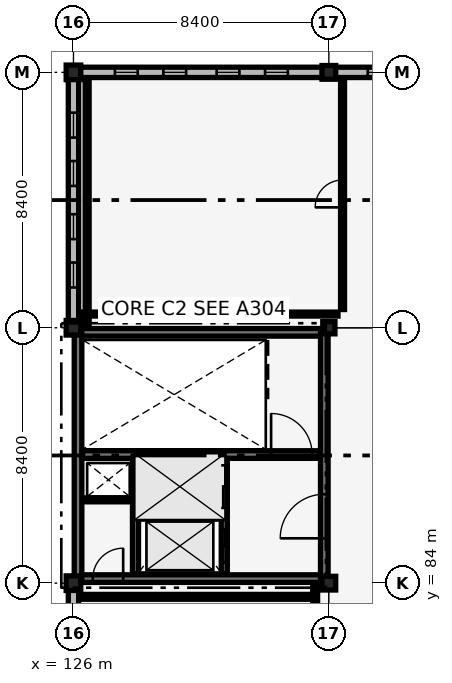
"""IFC4 building model, lengths in metres.
Left out: names, types, materials, properties, quantities, classifications, styles, units other than length and angle.
Written with IfcOpenShell. Run it as: python <this file> out.ifc"""

import sys

from ifc_helpers import new_model, si_unit, direction, frame, frame_2d, origin, origin_2d, place, context, subcontext, project, spatial, rectangle, extrude, element, fill, save


model = new_model("IFC4")
c1 = context("Model", 3, precision=1e-05, world=origin(), true_north=direction((0.0, 1.0)))
c2 = subcontext(c1, "Body", "Model", "MODEL_VIEW")
j1 = project(units=[si_unit("LENGTHUNIT", "METRE"), si_unit("PLANEANGLEUNIT", "RADIAN")], contexts=[c1])
p1 = place(None, origin())
s1 = spatial("IfcSite", under=j1, at=p1, CompositionType="ELEMENT")
p2 = place(p1, origin())
s2 = spatial("IfcBuilding", under=s1, at=p2, CompositionType="ELEMENT")
p3 = place(p2, frame((0.0, 0.0, 26.18)))
s3 = spatial("IfcBuildingStorey", under=s2, at=p3, CompositionType="ELEMENT", Elevation=26.18)
p4 = place(p3, frame((126.15, 84.15, 0.0), z_axis=(0.0, 0.0, 1.0), x_axis=(1.0, 0.0, 0.0)))
e1 = element("IfcWall", 1, at=p4, inside=s3, PredefinedType="SHEAR", context=c2, shape_type="SweptSolid", body=[
    extrude(rectangle(XDim=8.1, YDim=0.25, at=frame_2d((4.05, 0.0))), origin(), (0.0, 0.0, 1.0), 3.84),
])
p5 = place(p4, frame((0.485, 0.0, 0.0)))
e2 = element("IfcOpeningElement", 2, at=p5, cuts=e1, PredefinedType="OPENING", context=c2, shape_type="SweptSolid", body=[
    extrude(rectangle(XDim=1.0, YDim=2.15, at=frame_2d((0.5, 1.075))), frame((0.0, 0.135, 0.0), z_axis=(0.0, -1.0, 0.0), x_axis=(1.0, 0.0, 0.0)), (0.0, 0.0, 1.0), 0.27),
])
for number, where, z_axis, x_axis in (
    (3, (126.15, 92.25, 0.0), (0.0, 0.0, 1.0), (1.0, 0.0, 0.0)),
    (4, (126.15, 84.15, 0.0), (0.0, 0.0, 1.0), (0.0, 1.0, 0.0)),
):
    element("IfcWall", number, at=place(p3, frame(where, z_axis=z_axis, x_axis=x_axis)), inside=s3, PredefinedType="SHEAR", context=c2, shape_type="SweptSolid", body=[
        extrude(rectangle(XDim=8.1, YDim=0.25, at=frame_2d((4.05, 0.0))), origin(), (0.0, 0.0, 1.0), 3.84),
    ])
p6 = place(p3, frame((134.25, 84.15, 0.0), z_axis=(0.0, 0.0, 1.0), x_axis=(0.0, 1.0, 0.0)))
e5 = element("IfcWall", 5, at=p6, inside=s3, PredefinedType="SHEAR", context=c2, shape_type="SweptSolid", body=[
    extrude(rectangle(XDim=8.1, YDim=0.25, at=frame_2d((4.05, 0.0))), origin(), (0.0, 0.0, 1.0), 3.84),
])
p7 = place(p6, frame((1.325, 0.0, 0.0)))
e6 = element("IfcOpeningElement", 6, at=p7, cuts=e5, PredefinedType="OPENING", context=c2, shape_type="SweptSolid", body=[
    extrude(rectangle(XDim=1.45, YDim=2.15, at=frame_2d((0.725, 1.075))), frame((0.0, 0.135, 0.0), z_axis=(0.0, -1.0, 0.0), x_axis=(1.0, 0.0, 0.0)), (0.0, 0.0, 1.0), 0.27),
])
p8 = place(p3, frame((126.3, 88.23, 0.0), z_axis=(0.0, 0.0, 1.0), x_axis=(1.0, 0.0, 0.0)))
e7 = element("IfcWall", 7, at=p8, inside=s3, PredefinedType="SHEAR", context=c2, shape_type="SweptSolid", body=[
    extrude(rectangle(XDim=7.8, YDim=0.25, at=frame_2d((3.9, 0.0))), origin(), (0.0, 0.0, 1.0), 3.84),
])
p9 = place(p8, frame((6.2, 0.0, 0.0)))
e8 = element("IfcOpeningElement", 8, at=p9, cuts=e7, PredefinedType="OPENING", context=c2, shape_type="SweptSolid", body=[
    extrude(rectangle(XDim=1.35, YDim=2.15, at=frame_2d((0.675, 1.075))), frame((0.0, 0.135, 0.0), z_axis=(0.0, -1.0, 0.0), x_axis=(1.0, 0.0, 0.0)), (0.0, 0.0, 1.0), 0.27),
])
for number, where, z_axis, x_axis in (
    (9, (126.0, 84.0, 0.0), (0.0, 0.0, 1.0), (1.0, 0.0, 0.0)),
    (10, (126.0, 92.4, 0.0), (0.0, 0.0, 1.0), (1.0, 0.0, 0.0)),
    (11, (126.0, 100.8, 0.0), (0.0, 0.0, 1.0), (1.0, 0.0, 0.0)),
):
    element("IfcColumn", number, at=place(p3, frame(where, z_axis=z_axis, x_axis=x_axis)), inside=s3, PredefinedType="COLUMN", context=c2, shape_type="SweptSolid", body=[
        extrude(rectangle(XDim=0.48, YDim=0.48, at=origin_2d()), origin(), (0.0, 0.0, 1.0), 3.84),
    ])
p10 = place(p3, frame((134.4, 84.0, 0.0), z_axis=(0.0, 0.0, 1.0), x_axis=(1.0, 0.0, 0.0)))
e12 = element("IfcColumn", 12, at=p10, inside=s3, PredefinedType="COLUMN", context=c2, shape_type="SweptSolid", body=[
    extrude(rectangle(XDim=0.45, YDim=0.45, at=origin_2d()), origin(), (0.0, 0.0, 1.0), 3.84),
])
p11 = place(p3, frame((134.4, 92.4, 0.0), z_axis=(0.0, 0.0, 1.0), x_axis=(1.0, 0.0, 0.0)))
e13 = element("IfcColumn", 13, at=p11, inside=s3, PredefinedType="COLUMN", context=c2, shape_type="SweptSolid", body=[
    extrude(rectangle(XDim=0.4, YDim=0.4, at=origin_2d()), origin(), (0.0, 0.0, 1.0), 3.84),
])
p12 = place(p3, frame((134.4, 100.8, 0.0), z_axis=(0.0, 0.0, 1.0), x_axis=(1.0, 0.0, 0.0)))
e14 = element("IfcColumn", 14, at=p12, inside=s3, PredefinedType="COLUMN", context=c2, shape_type="SweptSolid", body=[
    extrude(rectangle(XDim=0.45, YDim=0.45, at=origin_2d()), origin(), (0.0, 0.0, 1.0), 3.84),
])
p13 = place(p3, frame((126.0, 75.825, 0.0), z_axis=(0.0, 0.0, 1.0), x_axis=(0.0, 1.0, 0.0)))
e15 = element("IfcWall", 15, at=p13, inside=s3, PredefinedType="SOLIDWALL", context=c2, shape_type="SweptSolid", body=[
    extrude(rectangle(XDim=7.95, YDim=0.34, at=frame_2d((3.975, 0.0))), origin(), (0.0, 0.0, 1.0), 3.48),
])
p14 = place(p13, frame((1.15, 0.0, 0.75)))
e16 = element("IfcOpeningElement", 16, at=p14, cuts=e15, PredefinedType="OPENING", context=c2, shape_type="SweptSolid", body=[
    extrude(rectangle(XDim=0.72, YDim=2.4, at=frame_2d((0.36, 1.2))), frame((0.0, 0.18, 0.0), z_axis=(0.0, -1.0, 0.0), x_axis=(1.0, 0.0, 0.0)), (0.0, 0.0, 1.0), 0.36),
])
p15 = place(p13, frame((2.74, 0.0, 0.75)))
e17 = element("IfcOpeningElement", 17, at=p15, cuts=e15, PredefinedType="OPENING", context=c2, shape_type="SweptSolid", body=[
    extrude(rectangle(XDim=0.72, YDim=2.4, at=frame_2d((0.36, 1.2))), frame((0.0, 0.18, 0.0), z_axis=(0.0, -1.0, 0.0), x_axis=(1.0, 0.0, 0.0)), (0.0, 0.0, 1.0), 0.36),
])
p16 = place(p13, frame((4.49, 0.0, 0.75)))
e18 = element("IfcOpeningElement", 18, at=p16, cuts=e15, PredefinedType="OPENING", context=c2, shape_type="SweptSolid", body=[
    extrude(rectangle(XDim=0.72, YDim=2.4, at=frame_2d((0.36, 1.2))), frame((0.0, 0.18, 0.0), z_axis=(0.0, -1.0, 0.0), x_axis=(1.0, 0.0, 0.0)), (0.0, 0.0, 1.0), 0.36),
])
p17 = place(p13, frame((6.08, 0.0, 0.75)))
e19 = element("IfcOpeningElement", 19, at=p17, cuts=e15, PredefinedType="OPENING", context=c2, shape_type="SweptSolid", body=[
    extrude(rectangle(XDim=0.72, YDim=2.4, at=frame_2d((0.36, 1.2))), frame((0.0, 0.18, 0.0), z_axis=(0.0, -1.0, 0.0), x_axis=(1.0, 0.0, 0.0)), (0.0, 0.0, 1.0), 0.36),
])
p18 = place(p3, frame((126.225, 100.8, 0.0), z_axis=(0.0, 0.0, 1.0), x_axis=(1.0, 0.0, 0.0)))
e20 = element("IfcWall", 20, at=p18, inside=s3, PredefinedType="SOLIDWALL", context=c2, shape_type="SweptSolid", body=[
    extrude(rectangle(XDim=7.965, YDim=0.34, at=frame_2d((3.982, 0.0))), origin(), (0.0, 0.0, 1.0), 3.84),
])
p19 = place(p18, frame((1.138, 0.0, 0.75)))
e21 = element("IfcOpeningElement", 21, at=p19, cuts=e20, PredefinedType="OPENING", context=c2, shape_type="SweptSolid", body=[
    extrude(rectangle(XDim=0.75, YDim=2.1, at=frame_2d((0.375, 1.05))), frame((0.0, 0.18, 0.0), z_axis=(0.0, -1.0, 0.0), x_axis=(1.0, 0.0, 0.0)), (0.0, 0.0, 1.0), 0.36),
])
p20 = place(p18, frame((2.731, 0.0, 0.75)))
e22 = element("IfcOpeningElement", 22, at=p20, cuts=e20, PredefinedType="OPENING", context=c2, shape_type="SweptSolid", body=[
    extrude(rectangle(XDim=0.75, YDim=2.1, at=frame_2d((0.375, 1.05))), frame((0.0, 0.18, 0.0), z_axis=(0.0, -1.0, 0.0), x_axis=(1.0, 0.0, 0.0)), (0.0, 0.0, 1.0), 0.36),
])
p21 = place(p18, frame((4.484, 0.0, 0.75)))
e23 = element("IfcOpeningElement", 23, at=p21, cuts=e20, PredefinedType="OPENING", context=c2, shape_type="SweptSolid", body=[
    extrude(rectangle(XDim=0.75, YDim=2.1, at=frame_2d((0.375, 1.05))), frame((0.0, 0.18, 0.0), z_axis=(0.0, -1.0, 0.0), x_axis=(1.0, 0.0, 0.0)), (0.0, 0.0, 1.0), 0.36),
])
p22 = place(p18, frame((6.077, 0.0, 0.75)))
e24 = element("IfcOpeningElement", 24, at=p22, cuts=e20, PredefinedType="OPENING", context=c2, shape_type="SweptSolid", body=[
    extrude(rectangle(XDim=0.75, YDim=2.1, at=frame_2d((0.375, 1.05))), frame((0.0, 0.18, 0.0), z_axis=(0.0, -1.0, 0.0), x_axis=(1.0, 0.0, 0.0)), (0.0, 0.0, 1.0), 0.36),
])
p23 = place(p3, frame((126.0, 92.625, 0.0), z_axis=(0.0, 0.0, 1.0), x_axis=(0.0, 1.0, 0.0)))
e25 = element("IfcWall", 25, at=p23, inside=s3, PredefinedType="SOLIDWALL", context=c2, shape_type="SweptSolid", body=[
    extrude(rectangle(XDim=7.95, YDim=0.34, at=frame_2d((3.975, 0.0))), origin(), (0.0, 0.0, 1.0), 3.48),
])
p24 = place(p23, frame((1.101, 0.0, 0.75)))
e26 = element("IfcOpeningElement", 26, at=p24, cuts=e25, PredefinedType="OPENING", context=c2, shape_type="SweptSolid", body=[
    extrude(rectangle(XDim=0.82, YDim=2.4, at=frame_2d((0.41, 1.2))), frame((0.0, 0.18, 0.0), z_axis=(0.0, -1.0, 0.0), x_axis=(1.0, 0.0, 0.0)), (0.0, 0.0, 1.0), 0.36),
])
p25 = place(p23, frame((2.69, 0.0, 0.75)))
e27 = element("IfcOpeningElement", 27, at=p25, cuts=e25, PredefinedType="OPENING", context=c2, shape_type="SweptSolid", body=[
    extrude(rectangle(XDim=0.82, YDim=2.4, at=frame_2d((0.41, 1.2))), frame((0.0, 0.18, 0.0), z_axis=(0.0, -1.0, 0.0), x_axis=(1.0, 0.0, 0.0)), (0.0, 0.0, 1.0), 0.36),
])
p26 = place(p23, frame((4.439, 0.0, 0.75)))
e28 = element("IfcOpeningElement", 28, at=p26, cuts=e25, PredefinedType="OPENING", context=c2, shape_type="SweptSolid", body=[
    extrude(rectangle(XDim=0.82, YDim=2.4, at=frame_2d((0.41, 1.2))), frame((0.0, 0.18, 0.0), z_axis=(0.0, -1.0, 0.0), x_axis=(1.0, 0.0, 0.0)), (0.0, 0.0, 1.0), 0.36),
])
p27 = place(p23, frame((6.03, 0.0, 0.75)))
e29 = element("IfcOpeningElement", 29, at=p27, cuts=e25, PredefinedType="OPENING", context=c2, shape_type="SweptSolid", body=[
    extrude(rectangle(XDim=0.82, YDim=2.4, at=frame_2d((0.41, 1.2))), frame((0.0, 0.18, 0.0), z_axis=(0.0, -1.0, 0.0), x_axis=(1.0, 0.0, 0.0)), (0.0, 0.0, 1.0), 0.36),
])
p28 = place(p3, frame((134.61, 100.8, 0.0), z_axis=(0.0, 0.0, 1.0), x_axis=(1.0, 0.0, 0.0)))
e30 = element("IfcWall", 30, at=p28, inside=s3, PredefinedType="SOLIDWALL", context=c2, shape_type="SweptSolid", body=[
    extrude(rectangle(XDim=7.995, YDim=0.34, at=frame_2d((3.998, 0.0))), origin(), (0.0, 0.0, 1.0), 3.84),
])
p29 = place(p28, frame((1.069, 0.0, 0.75)))
e31 = element("IfcOpeningElement", 31, at=p29, cuts=e30, PredefinedType="OPENING", context=c2, shape_type="SweptSolid", body=[
    extrude(rectangle(XDim=0.9, YDim=2.65, at=frame_2d((0.45, 1.325))), frame((0.0, 0.18, 0.0), z_axis=(0.0, -1.0, 0.0), x_axis=(1.0, 0.0, 0.0)), (0.0, 0.0, 1.0), 0.36),
])
p30 = place(p28, frame((4.427, 0.0, 0.75)))
e32 = element("IfcOpeningElement", 32, at=p30, cuts=e30, PredefinedType="OPENING", context=c2, shape_type="SweptSolid", body=[
    extrude(rectangle(XDim=0.9, YDim=2.65, at=frame_2d((0.45, 1.325))), frame((0.0, 0.18, 0.0), z_axis=(0.0, -1.0, 0.0), x_axis=(1.0, 0.0, 0.0)), (0.0, 0.0, 1.0), 0.36),
])
p31 = place(p28, frame((6.026, 0.0, 0.75)))
e33 = element("IfcOpeningElement", 33, at=p31, cuts=e30, PredefinedType="OPENING", context=c2, shape_type="SweptSolid", body=[
    extrude(rectangle(XDim=0.9, YDim=2.65, at=frame_2d((0.45, 1.325))), frame((0.0, 0.18, 0.0), z_axis=(0.0, -1.0, 0.0), x_axis=(1.0, 0.0, 0.0)), (0.0, 0.0, 1.0), 0.36),
])
p32 = place(p3, frame((130.96, 84.3, 0.0), z_axis=(0.0, 0.0, 1.0), x_axis=(0.0, 1.0, 0.0)))
e34 = element("IfcWall", 34, at=p32, inside=s3, PredefinedType="SHEAR", context=c2, shape_type="SweptSolid", body=[
    extrude(rectangle(XDim=3.8, YDim=0.2, at=frame_2d((1.9, 0.0))), origin(), (0.0, 0.0, 1.0), 3.84),
])
p33 = place(p32, frame((0.375, 0.0, 0.0)))
e35 = element("IfcOpeningElement", 35, at=p33, cuts=e34, PredefinedType="OPENING", context=c2, shape_type="SweptSolid", body=[
    extrude(rectangle(XDim=1.1, YDim=2.15, at=frame_2d((0.55, 1.075))), frame((0.0, 0.11, 0.0), z_axis=(0.0, -1.0, 0.0), x_axis=(1.0, 0.0, 0.0)), (0.0, 0.0, 1.0), 0.22),
])
p34 = place(p32, frame((2.175, 0.0, 0.0)))
e36 = element("IfcOpeningElement", 36, at=p34, cuts=e34, PredefinedType="OPENING", context=c2, shape_type="SweptSolid", body=[
    extrude(rectangle(XDim=1.4, YDim=2.2, at=frame_2d((0.7, 1.1))), frame((0.0, 0.11, 0.0), z_axis=(0.0, -1.0, 0.0), x_axis=(1.0, 0.0, 0.0)), (0.0, 0.0, 1.0), 0.22),
])
p35 = place(p3, frame((128.04, 84.3, 0.0), z_axis=(0.0, 0.0, 1.0), x_axis=(0.0, 1.0, 0.0)))
e37 = element("IfcWall", 37, at=p35, inside=s3, PredefinedType="SHEAR", context=c2, shape_type="SweptSolid", body=[
    extrude(rectangle(XDim=3.8, YDim=0.2, at=frame_2d((1.9, 0.0))), origin(), (0.0, 0.0, 1.0), 3.84),
])
p36 = place(p3, frame((128.15, 86.2, 0.0), z_axis=(0.0, 0.0, 1.0), x_axis=(1.0, 0.0, 0.0)))
e38 = element("IfcWall", 38, at=p36, inside=s3, PredefinedType="SHEAR", context=c2, shape_type="SweptSolid", body=[
    extrude(rectangle(XDim=2.7, YDim=0.18, at=frame_2d((1.35, 0.0))), origin(), (0.0, 0.0, 1.0), 3.84),
])
p37 = place(p3, frame((126.32, 86.74, 0.0), z_axis=(0.0, 0.0, 1.0), x_axis=(1.0, 0.0, 0.0)))
e39 = element("IfcWall", 39, at=p37, inside=s3, PredefinedType="PARTITIONING", context=c2, shape_type="SweptSolid", body=[
    extrude(rectangle(XDim=1.62, YDim=0.13, at=frame_2d((0.81, 0.0))), origin(), (0.0, 0.0, 1.0), 3.84),
])
p38 = place(p3, frame((133.95, 33.63, 0.0), z_axis=(0.0, 0.0, 1.0), x_axis=(0.0, 1.0, 0.0)))
e40 = element("IfcWall", 40, at=p38, inside=s3, PredefinedType="PARTITIONING", context=c2, shape_type="SweptSolid", body=[
    extrude(rectangle(XDim=50.34, YDim=0.16, at=frame_2d((25.17, 0.0))), origin(), (0.0, 0.0, 1.0), 3.84),
])
p39 = place(p38, frame((9.808, 0.0, 0.0)))
e41 = element("IfcOpeningElement", 41, at=p39, cuts=e40, PredefinedType="OPENING", context=c2, shape_type="SweptSolid", body=[
    extrude(rectangle(XDim=1.3, YDim=2.2, at=frame_2d((0.65, 1.1))), frame((0.0, 0.09, 0.0), z_axis=(0.0, -1.0, 0.0), x_axis=(1.0, 0.0, 0.0)), (0.0, 0.0, 1.0), 0.18),
])
p40 = place(p3, frame((126.18, 83.55, 0.0), z_axis=(0.0, 0.0, 1.0), x_axis=(1.0, 0.0, 0.0)))
e42 = element("IfcWall", 42, at=p40, inside=s3, PredefinedType="PARTITIONING", context=c2, shape_type="SweptSolid", body=[
    extrude(rectangle(XDim=7.62, YDim=0.16, at=frame_2d((3.81, 0.0))), origin(), (0.0, 0.0, 1.0), 3.48),
])
p41 = place(p3, frame((134.85, 93.0, 0.0), z_axis=(0.0, 0.0, 1.0), x_axis=(0.0, 1.0, 0.0)))
e43 = element("IfcWall", 43, at=p41, inside=s3, PredefinedType="PARTITIONING", context=c2, shape_type="SweptSolid", body=[
    extrude(rectangle(XDim=7.62, YDim=0.13, at=frame_2d((3.81, 0.0))), origin(), (0.0, 0.0, 1.0), 3.84),
])
p42 = place(p41, frame((3.36, 0.0, 0.0)))
e44 = element("IfcOpeningElement", 44, at=p42, cuts=e43, PredefinedType="OPENING", context=c2, shape_type="SweptSolid", body=[
    extrude(rectangle(XDim=0.9, YDim=2.1, at=frame_2d((0.45, 1.05))), frame((0.0, 0.075, 0.0), z_axis=(0.0, -1.0, 0.0), x_axis=(1.0, 0.0, 0.0)), (0.0, 0.0, 1.0), 0.15),
])
p43 = place(p3, frame((126.18, 92.85, 0.0), z_axis=(0.0, 0.0, 1.0), x_axis=(1.0, 0.0, 0.0)))
e45 = element("IfcWall", 45, at=p43, inside=s3, PredefinedType="PARTITIONING", context=c2, shape_type="SweptSolid", body=[
    extrude(rectangle(XDim=8.52, YDim=0.13, at=frame_2d((4.26, 0.0))), origin(), (0.0, 0.0, 1.0), 3.48),
])
p44 = place(p3, frame((126.45, 92.43, 0.0), z_axis=(0.0, 0.0, 1.0), x_axis=(0.0, 1.0, 0.0)))
e46 = element("IfcWall", 46, at=p44, inside=s3, PredefinedType="PARTITIONING", context=c2, shape_type="SweptSolid", body=[
    extrude(rectangle(XDim=8.19, YDim=0.13, at=frame_2d((4.095, 0.0))), origin(), (0.0, 0.0, 1.0), 3.84),
])
p45 = place(p19, origin())
e47 = element("IfcWindow", 47, at=p45, inside=s3, PartitioningType="DOUBLE_PANEL_VERTICAL", PredefinedType="WINDOW", context=c2, shape_type="SweptSolid", body=[
    extrude(rectangle(XDim=0.75, YDim=2.1, at=frame_2d((0.375, 1.05))), frame((0.0, 0.03, 0.0), z_axis=(0.0, -1.0, 0.0), x_axis=(1.0, 0.0, 0.0)), (0.0, 0.0, 1.0), 0.06),
])
fill(e21, e47)
p46 = place(p20, origin())
e48 = element("IfcWindow", 48, at=p46, inside=s3, PartitioningType="DOUBLE_PANEL_VERTICAL", PredefinedType="WINDOW", context=c2, shape_type="SweptSolid", body=[
    extrude(rectangle(XDim=0.75, YDim=2.1, at=frame_2d((0.375, 1.05))), frame((0.0, 0.03, 0.0), z_axis=(0.0, -1.0, 0.0), x_axis=(1.0, 0.0, 0.0)), (0.0, 0.0, 1.0), 0.06),
])
fill(e22, e48)
p47 = place(p21, origin())
e49 = element("IfcWindow", 49, at=p47, inside=s3, PartitioningType="DOUBLE_PANEL_VERTICAL", PredefinedType="WINDOW", context=c2, shape_type="SweptSolid", body=[
    extrude(rectangle(XDim=0.75, YDim=2.1, at=frame_2d((0.375, 1.05))), frame((0.0, 0.03, 0.0), z_axis=(0.0, -1.0, 0.0), x_axis=(1.0, 0.0, 0.0)), (0.0, 0.0, 1.0), 0.06),
])
fill(e23, e49)
p48 = place(p22, origin())
e50 = element("IfcWindow", 50, at=p48, inside=s3, PartitioningType="DOUBLE_PANEL_VERTICAL", PredefinedType="WINDOW", context=c2, shape_type="SweptSolid", body=[
    extrude(rectangle(XDim=0.75, YDim=2.1, at=frame_2d((0.375, 1.05))), frame((0.0, 0.03, 0.0), z_axis=(0.0, -1.0, 0.0), x_axis=(1.0, 0.0, 0.0)), (0.0, 0.0, 1.0), 0.06),
])
fill(e24, e50)
p49 = place(p24, origin())
e51 = element("IfcWindow", 51, at=p49, inside=s3, PartitioningType="DOUBLE_PANEL_VERTICAL", PredefinedType="WINDOW", context=c2, shape_type="SweptSolid", body=[
    extrude(rectangle(XDim=0.82, YDim=2.4, at=frame_2d((0.41, 1.2))), frame((0.0, 0.03, 0.0), z_axis=(0.0, -1.0, 0.0), x_axis=(1.0, 0.0, 0.0)), (0.0, 0.0, 1.0), 0.06),
])
fill(e26, e51)
p50 = place(p25, origin())
e52 = element("IfcWindow", 52, at=p50, inside=s3, PartitioningType="DOUBLE_PANEL_VERTICAL", PredefinedType="WINDOW", context=c2, shape_type="SweptSolid", body=[
    extrude(rectangle(XDim=0.82, YDim=2.4, at=frame_2d((0.41, 1.2))), frame((0.0, 0.03, 0.0), z_axis=(0.0, -1.0, 0.0), x_axis=(1.0, 0.0, 0.0)), (0.0, 0.0, 1.0), 0.06),
])
fill(e27, e52)
p51 = place(p26, origin())
e53 = element("IfcWindow", 53, at=p51, inside=s3, PartitioningType="DOUBLE_PANEL_VERTICAL", PredefinedType="WINDOW", context=c2, shape_type="SweptSolid", body=[
    extrude(rectangle(XDim=0.82, YDim=2.4, at=frame_2d((0.41, 1.2))), frame((0.0, 0.03, 0.0), z_axis=(0.0, -1.0, 0.0), x_axis=(1.0, 0.0, 0.0)), (0.0, 0.0, 1.0), 0.06),
])
fill(e28, e53)
p52 = place(p27, origin())
e54 = element("IfcWindow", 54, at=p52, inside=s3, PartitioningType="DOUBLE_PANEL_VERTICAL", PredefinedType="WINDOW", context=c2, shape_type="SweptSolid", body=[
    extrude(rectangle(XDim=0.82, YDim=2.4, at=frame_2d((0.41, 1.2))), frame((0.0, 0.03, 0.0), z_axis=(0.0, -1.0, 0.0), x_axis=(1.0, 0.0, 0.0)), (0.0, 0.0, 1.0), 0.06),
])
fill(e29, e54)
p53 = place(p29, origin())
e55 = element("IfcWindow", 55, at=p53, inside=s3, PartitioningType="DOUBLE_PANEL_VERTICAL", PredefinedType="WINDOW", context=c2, shape_type="SweptSolid", body=[
    extrude(rectangle(XDim=0.9, YDim=2.65, at=frame_2d((0.45, 1.325))), frame((0.0, 0.03, 0.0), z_axis=(0.0, -1.0, 0.0), x_axis=(1.0, 0.0, 0.0)), (0.0, 0.0, 1.0), 0.06),
])
fill(e31, e55)
p54 = place(p9, origin())
e56 = element("IfcDoor", 56, at=p54, inside=s3, OperationType="SINGLE_SWING_LEFT", PredefinedType="DOOR", context=c2, shape_type="SweptSolid", body=[
    extrude(rectangle(XDim=1.35, YDim=2.15, at=frame_2d((0.675, 1.075))), frame((0.0, 0.025, 0.0), z_axis=(0.0, -1.0, 0.0), x_axis=(1.0, 0.0, 0.0)), (0.0, 0.0, 1.0), 0.05),
])
fill(e8, e56)
p55 = place(p33, origin())
e57 = element("IfcDoor", 57, at=p55, inside=s3, OperationType="SLIDING_TO_LEFT", PredefinedType="DOOR", context=c2, shape_type="SweptSolid", body=[
    extrude(rectangle(XDim=1.1, YDim=2.15, at=frame_2d((0.55, 1.075))), frame((0.0, 0.025, 0.0), z_axis=(0.0, -1.0, 0.0), x_axis=(1.0, 0.0, 0.0)), (0.0, 0.0, 1.0), 0.05),
])
fill(e35, e57)
p56 = place(p34, origin())
e58 = element("IfcDoor", 58, at=p56, inside=s3, OperationType="SLIDING_TO_LEFT", PredefinedType="DOOR", context=c2, shape_type="SweptSolid", body=[
    extrude(rectangle(XDim=1.4, YDim=2.2, at=frame_2d((0.7, 1.1))), frame((0.0, 0.025, 0.0), z_axis=(0.0, -1.0, 0.0), x_axis=(1.0, 0.0, 0.0)), (0.0, 0.0, 1.0), 0.05),
])
fill(e36, e58)
p57 = place(p7, origin())
e59 = element("IfcDoor", 59, at=p57, inside=s3, OperationType="DOUBLE_DOOR_SINGLE_SWING", PredefinedType="DOOR", context=c2, shape_type="SweptSolid", body=[
    extrude(rectangle(XDim=1.45, YDim=2.15, at=frame_2d((0.725, 1.075))), frame((0.0, 0.025, 0.0), z_axis=(0.0, -1.0, 0.0), x_axis=(1.0, 0.0, 0.0)), (0.0, 0.0, 1.0), 0.05),
])
fill(e6, e59)
p58 = place(p5, origin())
e60 = element("IfcDoor", 60, at=p58, inside=s3, OperationType="SINGLE_SWING_RIGHT", PredefinedType="DOOR", context=c2, shape_type="SweptSolid", body=[
    extrude(rectangle(XDim=1.0, YDim=2.15, at=frame_2d((0.5, 1.075))), frame((0.0, 0.025, 0.0), z_axis=(0.0, -1.0, 0.0), x_axis=(1.0, 0.0, 0.0)), (0.0, 0.0, 1.0), 0.05),
])
fill(e2, e60)
p59 = place(p42, origin())
e61 = element("IfcDoor", 61, at=p59, inside=s3, OperationType="SINGLE_SWING_LEFT", PredefinedType="DOOR", context=c2, shape_type="SweptSolid", body=[
    extrude(rectangle(XDim=0.9, YDim=2.1, at=frame_2d((0.45, 1.05))), frame((0.0, 0.025, 0.0), z_axis=(0.0, -1.0, 0.0), x_axis=(1.0, 0.0, 0.0)), (0.0, 0.0, 1.0), 0.05),
])
fill(e44, e61)
save(model, sys.argv[1])
